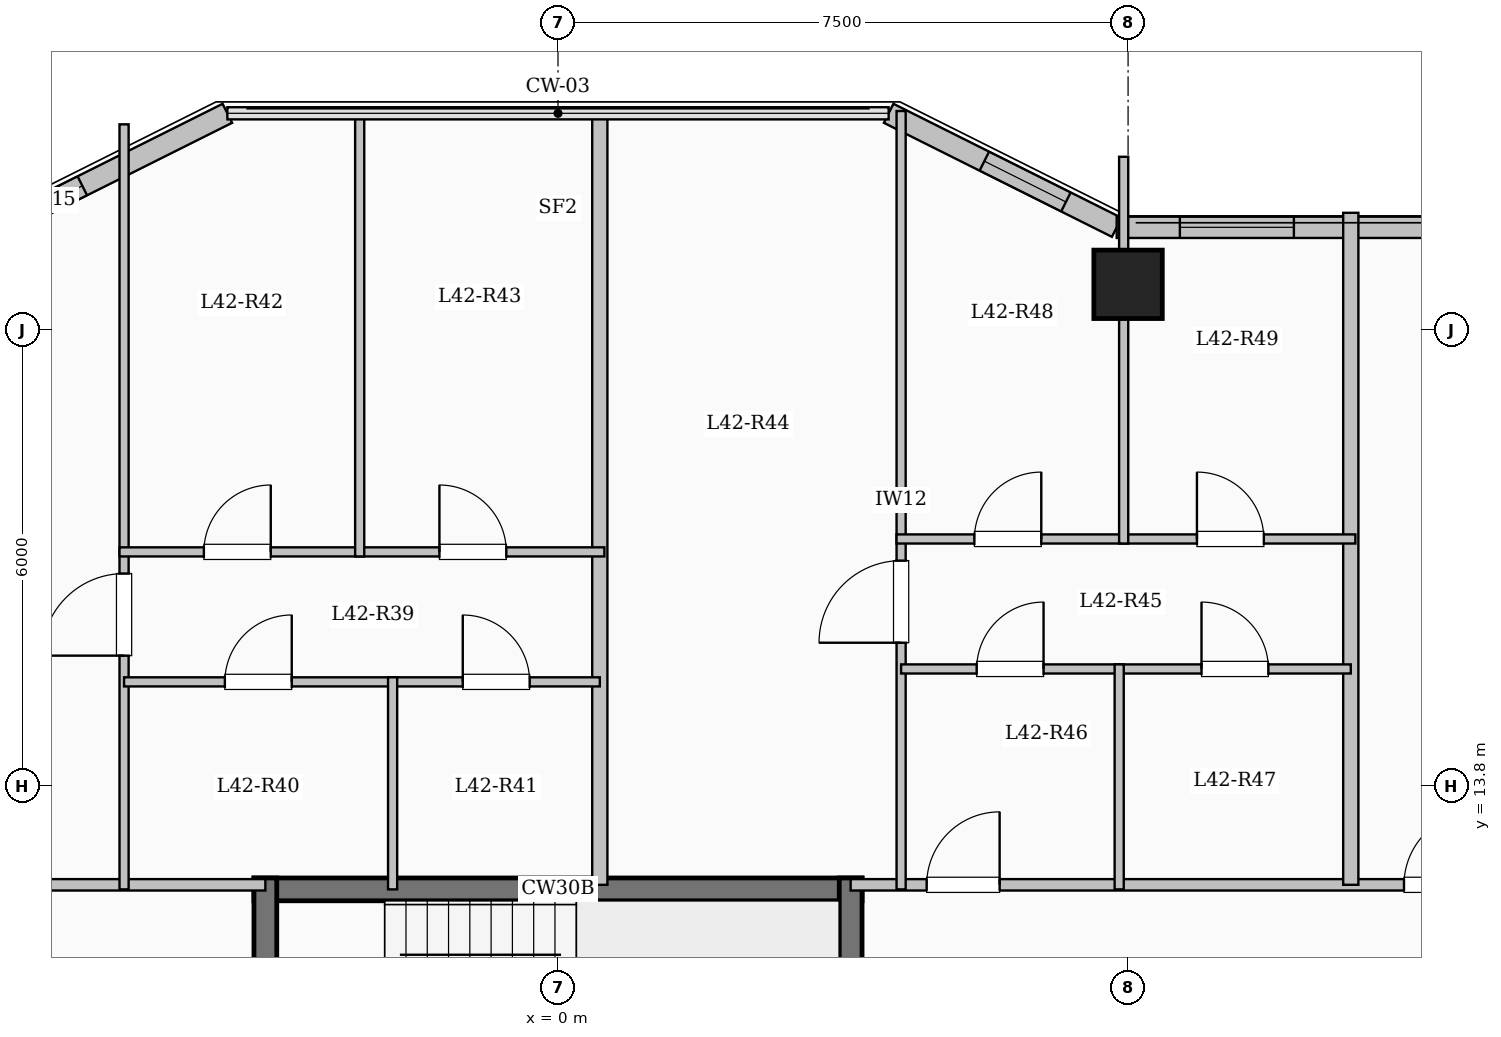
"""IFC4 building model, lengths in metres.
Left out: names, types, materials, properties, quantities, classifications, styles, units other than length and angle.
Written with IfcOpenShell. Run it as: python <this file> out.ifc"""

import sys

from ifc_helpers import new_model, si_unit, direction, frame, frame_2d, origin, origin_2d, place, context, subcontext, project, spatial, rectangle, extrude, element, fill, save


model = new_model("IFC4")
c1 = context("Model", 3, precision=1e-05, world=origin(), true_north=direction((0.0, 1.0)))
c2 = subcontext(c1, "Body", "Model", "MODEL_VIEW")
j1 = project(units=[si_unit("LENGTHUNIT", "METRE"), si_unit("PLANEANGLEUNIT", "RADIAN")], contexts=[c1])
p1 = place(None, origin())
s1 = spatial("IfcSite", under=j1, at=p1, CompositionType="ELEMENT")
p2 = place(p1, origin())
s2 = spatial("IfcBuilding", under=s1, at=p2, CompositionType="ELEMENT")
p3 = place(p2, frame((0.0, 0.0, 156.05)))
s3 = spatial("IfcBuildingStorey", under=s2, at=p3, CompositionType="ELEMENT", Elevation=156.05)
p4 = place(p3, frame((7.5, 20.4, 0.0), z_axis=(0.0, 0.0, 1.0), x_axis=(1.0, 0.0, 0.0)))
e1 = element("IfcColumn", 1, at=p4, inside=s3, PredefinedType="COLUMN", context=c2, shape_type="SweptSolid", body=[
    extrude(rectangle(XDim=0.9, YDim=0.9, at=origin_2d()), origin(), (0.0, 0.0, 1.0), 3.35),
])
p5 = place(p3, frame((-7.35, 21.15, 0.0), z_axis=(0.0, 0.0, 1.0), x_axis=(0.894427191, 0.4472135955, 0.0)))
e2 = element("IfcWall", 2, at=p5, inside=s3, PredefinedType="SOLIDWALL", context=c2, shape_type="SweptSolid", body=[
    extrude(rectangle(XDim=3.354, YDim=0.28, at=frame_2d((1.677, 0.0))), origin(), (0.0, 0.0, 1.0), 3.1),
])
p6 = place(p5, frame((0.371, 0.0, 0.95)))
e3 = element("IfcOpeningElement", 3, at=p6, cuts=e2, PredefinedType="OPENING", context=c2, shape_type="SweptSolid", body=[
    extrude(rectangle(XDim=0.85, YDim=1.5, at=frame_2d((0.425, 0.75))), frame((0.0, 0.15, 0.0), z_axis=(0.0, -1.0, 0.0), x_axis=(1.0, 0.0, 0.0)), (0.0, 0.0, 1.0), 0.3),
])
p7 = place(p3, frame((4.35, 22.65, 0.0), z_axis=(0.0, 0.0, 1.0), x_axis=(0.894427191, -0.4472135955, 0.0)))
e4 = element("IfcWall", 4, at=p7, inside=s3, PredefinedType="SOLIDWALL", context=c2, shape_type="SweptSolid", body=[
    extrude(rectangle(XDim=3.354, YDim=0.28, at=frame_2d((1.677, 0.0))), origin(), (0.0, 0.0, 1.0), 3.1),
])
p8 = place(p7, frame((1.407, 0.0, 0.95)))
e5 = element("IfcOpeningElement", 5, at=p8, cuts=e4, PredefinedType="OPENING", context=c2, shape_type="SweptSolid", body=[
    extrude(rectangle(XDim=1.2, YDim=1.5, at=frame_2d((0.6, 0.75))), frame((0.0, 0.15, 0.0), z_axis=(0.0, -1.0, 0.0), x_axis=(1.0, 0.0, 0.0)), (0.0, 0.0, 1.0), 0.3),
])
p9 = place(p3, frame((7.35, 21.15, 0.0), z_axis=(0.0, 0.0, 1.0), x_axis=(1.0, 0.0, 0.0)))
e6 = element("IfcWall", 6, at=p9, inside=s3, PredefinedType="SOLIDWALL", context=c2, shape_type="SweptSolid", body=[
    extrude(rectangle(XDim=12.3, YDim=0.28, at=frame_2d((6.15, 0.0))), origin(), (0.0, 0.0, 1.0), 3.1),
])
p10 = place(p9, frame((0.831, 0.0, 0.9)))
e7 = element("IfcOpeningElement", 7, at=p10, cuts=e6, PredefinedType="OPENING", context=c2, shape_type="SweptSolid", body=[
    extrude(rectangle(XDim=1.5, YDim=1.65, at=frame_2d((0.75, 0.825))), frame((0.0, 0.15, 0.0), z_axis=(0.0, -1.0, 0.0), x_axis=(1.0, 0.0, 0.0)), (0.0, 0.0, 1.0), 0.3),
])
p11 = place(p9, frame((4.272, 0.0, 0.9)))
e8 = element("IfcOpeningElement", 8, at=p11, cuts=e6, PredefinedType="OPENING", context=c2, shape_type="SweptSolid", body=[
    extrude(rectangle(XDim=2.2, YDim=1.75, at=frame_2d((1.1, 0.875))), frame((0.0, 0.15, 0.0), z_axis=(0.0, -1.0, 0.0), x_axis=(1.0, 0.0, 0.0)), (0.0, 0.0, 1.0), 0.3),
])
p12 = place(p9, frame((9.115, 0.0, 0.9)))
e9 = element("IfcOpeningElement", 9, at=p12, cuts=e6, PredefinedType="OPENING", context=c2, shape_type="SweptSolid", body=[
    extrude(rectangle(XDim=1.65, YDim=1.6, at=frame_2d((0.825, 0.8))), frame((0.0, 0.15, 0.0), z_axis=(0.0, -1.0, 0.0), x_axis=(1.0, 0.0, 0.0)), (0.0, 0.0, 1.0), 0.3),
])
p13 = place(p3, frame((-4.0, 12.44, 0.0), z_axis=(0.0, 0.0, 1.0), x_axis=(1.0, 0.0, 0.0)))
e10 = element("IfcWall", 10, at=p13, inside=s3, PredefinedType="SHEAR", context=c2, shape_type="SweptSolid", body=[
    extrude(rectangle(XDim=8.0, YDim=0.3, at=frame_2d((4.0, 0.0))), origin(), (0.0, 0.0, 1.0), 3.35),
])
for number, where, z_axis, x_axis in (
    (11, (-3.85, 9.0, 0.0), (0.0, 0.0, 1.0), (0.0, 1.0, 0.0)),
    (12, (3.85, 9.0, 0.0), (0.0, 0.0, 1.0), (0.0, 1.0, 0.0)),
):
    element("IfcWall", number, at=place(p3, frame(where, z_axis=z_axis, x_axis=x_axis)), inside=s3, PredefinedType="SHEAR", context=c2, shape_type="SweptSolid", body=[
        extrude(rectangle(XDim=3.59, YDim=0.3, at=frame_2d((1.795, 0.0))), origin(), (0.0, 0.0, 1.0), 3.35),
    ])
p14 = place(p3, frame((-19.55, 12.5, 0.0), z_axis=(0.0, 0.0, 1.0), x_axis=(1.0, 0.0, 0.0)))
e13 = element("IfcWall", 13, at=p14, inside=s3, PredefinedType="PARTITIONING", context=c2, shape_type="SweptSolid", body=[
    extrude(rectangle(XDim=15.7, YDim=0.15, at=frame_2d((7.85, 0.0))), origin(), (0.0, 0.0, 1.0), 3.1),
])
p15 = place(p14, frame((0.7, 0.0, 0.0)))
e14 = element("IfcOpeningElement", 14, at=p15, cuts=e13, PredefinedType="OPENING", context=c2, shape_type="SweptSolid", body=[
    extrude(rectangle(XDim=0.96, YDim=2.15, at=frame_2d((0.48, 1.075))), frame((0.0, 0.085, 0.0), z_axis=(0.0, -1.0, 0.0), x_axis=(1.0, 0.0, 0.0)), (0.0, 0.0, 1.0), 0.17),
])
p16 = place(p14, frame((10.348, 0.0, 0.0)))
e15 = element("IfcOpeningElement", 15, at=p16, cuts=e13, PredefinedType="OPENING", context=c2, shape_type="SweptSolid", body=[
    extrude(rectangle(XDim=0.96, YDim=2.15, at=frame_2d((0.48, 1.075))), frame((0.0, 0.085, 0.0), z_axis=(0.0, -1.0, 0.0), x_axis=(1.0, 0.0, 0.0)), (0.0, 0.0, 1.0), 0.17),
])
p17 = place(p3, frame((3.85, 12.5, 0.0), z_axis=(0.0, 0.0, 1.0), x_axis=(1.0, 0.0, 0.0)))
e16 = element("IfcWall", 16, at=p17, inside=s3, PredefinedType="PARTITIONING", context=c2, shape_type="SweptSolid", body=[
    extrude(rectangle(XDim=15.7, YDim=0.15, at=frame_2d((7.85, 0.0))), origin(), (0.0, 0.0, 1.0), 3.1),
])
p18 = place(p17, frame((1.0, 0.0, 0.0)))
e17 = element("IfcOpeningElement", 17, at=p18, cuts=e16, PredefinedType="OPENING", context=c2, shape_type="SweptSolid", body=[
    extrude(rectangle(XDim=0.96, YDim=2.15, at=frame_2d((0.48, 1.075))), frame((0.0, 0.085, 0.0), z_axis=(0.0, -1.0, 0.0), x_axis=(1.0, 0.0, 0.0)), (0.0, 0.0, 1.0), 0.17),
])
p19 = place(p17, frame((7.28, 0.0, 0.0)))
e18 = element("IfcOpeningElement", 18, at=p19, cuts=e16, PredefinedType="OPENING", context=c2, shape_type="SweptSolid", body=[
    extrude(rectangle(XDim=0.96, YDim=2.15, at=frame_2d((0.48, 1.075))), frame((0.0, 0.085, 0.0), z_axis=(0.0, -1.0, 0.0), x_axis=(1.0, 0.0, 0.0)), (0.0, 0.0, 1.0), 0.17),
])
p20 = place(p3, frame((0.55, 12.5, 0.0), z_axis=(0.0, 0.0, 1.0), x_axis=(0.0, 1.0, 0.0)))
e19 = element("IfcWall", 19, at=p20, inside=s3, PredefinedType="SOLIDWALL", context=c2, shape_type="SweptSolid", body=[
    extrude(rectangle(XDim=10.18, YDim=0.2, at=frame_2d((5.09, 0.0))), origin(), (0.0, 0.0, 1.0), 3.1),
])
p21 = place(p3, frame((-5.709, 12.44, 0.0), z_axis=(0.0, 0.0, 1.0), x_axis=(0.0, 1.0, 0.0)))
e20 = element("IfcWall", 20, at=p21, inside=s3, PredefinedType="PARTITIONING", context=c2, shape_type="SweptSolid", body=[
    extrude(rectangle(XDim=10.065, YDim=0.12, at=frame_2d((5.032, 0.0))), origin(), (0.0, 0.0, 1.0), 3.1),
])
p22 = place(p21, frame((3.075, 0.0, 0.0)))
e21 = element("IfcOpeningElement", 21, at=p22, cuts=e20, PredefinedType="OPENING", context=c2, shape_type="SweptSolid", body=[
    extrude(rectangle(XDim=1.08, YDim=2.15, at=frame_2d((0.54, 1.075))), frame((0.0, 0.07, 0.0), z_axis=(0.0, -1.0, 0.0), x_axis=(1.0, 0.0, 0.0)), (0.0, 0.0, 1.0), 0.14),
])
p23 = place(p3, frame((-5.709, 15.17, 0.0), z_axis=(0.0, 0.0, 1.0), x_axis=(1.0, 0.0, 0.0)))
e22 = element("IfcWall", 22, at=p23, inside=s3, PredefinedType="PARTITIONING", context=c2, shape_type="SweptSolid", body=[
    extrude(rectangle(XDim=3.533, YDim=0.12, at=frame_2d((1.767, 0.0))), origin(), (0.0, 0.0, 1.0), 3.1),
])
p24 = place(p23, frame((1.326, 0.0, 0.0)))
e23 = element("IfcOpeningElement", 23, at=p24, cuts=e22, PredefinedType="OPENING", context=c2, shape_type="SweptSolid", body=[
    extrude(rectangle(XDim=0.88, YDim=2.1, at=frame_2d((0.44, 1.05))), frame((0.0, 0.07, 0.0), z_axis=(0.0, -1.0, 0.0), x_axis=(1.0, 0.0, 0.0)), (0.0, 0.0, 1.0), 0.14),
])
p25 = place(p3, frame((-2.176, 15.17, 0.0), z_axis=(0.0, 0.0, 1.0), x_axis=(1.0, 0.0, 0.0)))
e24 = element("IfcWall", 24, at=p25, inside=s3, PredefinedType="PARTITIONING", context=c2, shape_type="SweptSolid", body=[
    extrude(rectangle(XDim=2.726, YDim=0.12, at=frame_2d((1.363, 0.0))), origin(), (0.0, 0.0, 1.0), 3.1),
])
p26 = place(p25, frame((0.923, 0.0, 0.0)))
e25 = element("IfcOpeningElement", 25, at=p26, cuts=e24, PredefinedType="OPENING", context=c2, shape_type="SweptSolid", body=[
    extrude(rectangle(XDim=0.88, YDim=2.1, at=frame_2d((0.44, 1.05))), frame((0.0, 0.07, 0.0), z_axis=(0.0, -1.0, 0.0), x_axis=(1.0, 0.0, 0.0)), (0.0, 0.0, 1.0), 0.14),
])
p27 = place(p3, frame((-5.769, 16.88, 0.0), z_axis=(0.0, 0.0, 1.0), x_axis=(1.0, 0.0, 0.0)))
e26 = element("IfcWall", 26, at=p27, inside=s3, PredefinedType="PARTITIONING", context=c2, shape_type="SweptSolid", body=[
    extrude(rectangle(XDim=6.379, YDim=0.12, at=frame_2d((3.189, 0.0))), origin(), (0.0, 0.0, 1.0), 2.685),
])
p28 = place(p27, frame((1.11, 0.0, 0.0)))
e27 = element("IfcOpeningElement", 27, at=p28, cuts=e26, PredefinedType="OPENING", context=c2, shape_type="SweptSolid", body=[
    extrude(rectangle(XDim=0.88, YDim=2.1, at=frame_2d((0.44, 1.05))), frame((0.0, 0.07, 0.0), z_axis=(0.0, -1.0, 0.0), x_axis=(1.0, 0.0, 0.0)), (0.0, 0.0, 1.0), 0.14),
])
p29 = place(p27, frame((4.209, 0.0, 0.0)))
e28 = element("IfcOpeningElement", 28, at=p29, cuts=e26, PredefinedType="OPENING", context=c2, shape_type="SweptSolid", body=[
    extrude(rectangle(XDim=0.88, YDim=2.1, at=frame_2d((0.44, 1.05))), frame((0.0, 0.07, 0.0), z_axis=(0.0, -1.0, 0.0), x_axis=(1.0, 0.0, 0.0)), (0.0, 0.0, 1.0), 0.14),
])
p30 = place(p3, frame((-2.176, 12.44, 0.0), z_axis=(0.0, 0.0, 1.0), x_axis=(0.0, 1.0, 0.0)))
e29 = element("IfcWall", 29, at=p30, inside=s3, PredefinedType="PARTITIONING", context=c2, shape_type="SweptSolid", body=[
    extrude(rectangle(XDim=2.79, YDim=0.12, at=frame_2d((1.395, 0.0))), origin(), (0.0, 0.0, 1.0), 3.1),
])
p31 = place(p3, frame((-2.609, 16.82, 0.0), z_axis=(0.0, 0.0, 1.0), x_axis=(0.0, 1.0, 0.0)))
e30 = element("IfcWall", 30, at=p31, inside=s3, PredefinedType="PARTITIONING", context=c2, shape_type="SweptSolid", body=[
    extrude(rectangle(XDim=5.86, YDim=0.12, at=frame_2d((2.93, 0.0))), origin(), (0.0, 0.0, 1.0), 3.1),
])
p32 = place(p3, frame((10.43, 12.5, 0.0), z_axis=(0.0, 0.0, 1.0), x_axis=(0.0, 1.0, 0.0)))
e31 = element("IfcWall", 31, at=p32, inside=s3, PredefinedType="SOLIDWALL", context=c2, shape_type="SweptSolid", body=[
    extrude(rectangle(XDim=8.841, YDim=0.2, at=frame_2d((4.42, 0.0))), origin(), (0.0, 0.0, 1.0), 3.1),
])
p33 = place(p3, frame((4.514, 12.44, 0.0), z_axis=(0.0, 0.0, 1.0), x_axis=(0.0, 1.0, 0.0)))
e32 = element("IfcWall", 32, at=p33, inside=s3, PredefinedType="PARTITIONING", context=c2, shape_type="SweptSolid", body=[
    extrude(rectangle(XDim=10.24, YDim=0.12, at=frame_2d((5.12, 0.0))), origin(), (0.0, 0.0, 1.0), 3.1),
])
p34 = place(p33, frame((3.245, 0.0, 0.0)))
e33 = element("IfcOpeningElement", 33, at=p34, cuts=e32, PredefinedType="OPENING", context=c2, shape_type="SweptSolid", body=[
    extrude(rectangle(XDim=1.08, YDim=2.15, at=frame_2d((0.54, 1.075))), frame((0.0, 0.07, 0.0), z_axis=(0.0, -1.0, 0.0), x_axis=(1.0, 0.0, 0.0)), (0.0, 0.0, 1.0), 0.14),
])
p35 = place(p3, frame((4.514, 15.34, 0.0), z_axis=(0.0, 0.0, 1.0), x_axis=(1.0, 0.0, 0.0)))
e34 = element("IfcWall", 34, at=p35, inside=s3, PredefinedType="PARTITIONING", context=c2, shape_type="SweptSolid", body=[
    extrude(rectangle(XDim=2.869, YDim=0.12, at=frame_2d((1.435, 0.0))), origin(), (0.0, 0.0, 1.0), 3.1),
])
p36 = place(p35, frame((0.994, 0.0, 0.0)))
e35 = element("IfcOpeningElement", 35, at=p36, cuts=e34, PredefinedType="OPENING", context=c2, shape_type="SweptSolid", body=[
    extrude(rectangle(XDim=0.88, YDim=2.1, at=frame_2d((0.44, 1.05))), frame((0.0, 0.07, 0.0), z_axis=(0.0, -1.0, 0.0), x_axis=(1.0, 0.0, 0.0)), (0.0, 0.0, 1.0), 0.14),
])
p37 = place(p3, frame((7.383, 15.34, 0.0), z_axis=(0.0, 0.0, 1.0), x_axis=(1.0, 0.0, 0.0)))
e36 = element("IfcWall", 36, at=p37, inside=s3, PredefinedType="PARTITIONING", context=c2, shape_type="SweptSolid", body=[
    extrude(rectangle(XDim=3.047, YDim=0.12, at=frame_2d((1.523, 0.0))), origin(), (0.0, 0.0, 1.0), 3.1),
])
p38 = place(p37, frame((1.083, 0.0, 0.0)))
e37 = element("IfcOpeningElement", 37, at=p38, cuts=e36, PredefinedType="OPENING", context=c2, shape_type="SweptSolid", body=[
    extrude(rectangle(XDim=0.88, YDim=2.1, at=frame_2d((0.44, 1.05))), frame((0.0, 0.07, 0.0), z_axis=(0.0, -1.0, 0.0), x_axis=(1.0, 0.0, 0.0)), (0.0, 0.0, 1.0), 0.14),
])
p39 = place(p3, frame((4.454, 17.05, 0.0), z_axis=(0.0, 0.0, 1.0), x_axis=(1.0, 0.0, 0.0)))
e38 = element("IfcWall", 38, at=p39, inside=s3, PredefinedType="PARTITIONING", context=c2, shape_type="SweptSolid", body=[
    extrude(rectangle(XDim=6.036, YDim=0.12, at=frame_2d((3.018, 0.0))), origin(), (0.0, 0.0, 1.0), 2.685),
])
p40 = place(p39, frame((1.024, 0.0, 0.0)))
e39 = element("IfcOpeningElement", 39, at=p40, cuts=e38, PredefinedType="OPENING", context=c2, shape_type="SweptSolid", body=[
    extrude(rectangle(XDim=0.88, YDim=2.1, at=frame_2d((0.44, 1.05))), frame((0.0, 0.07, 0.0), z_axis=(0.0, -1.0, 0.0), x_axis=(1.0, 0.0, 0.0)), (0.0, 0.0, 1.0), 0.14),
])
p41 = place(p39, frame((3.952, 0.0, 0.0)))
e40 = element("IfcOpeningElement", 40, at=p41, cuts=e38, PredefinedType="OPENING", context=c2, shape_type="SweptSolid", body=[
    extrude(rectangle(XDim=0.88, YDim=2.1, at=frame_2d((0.44, 1.05))), frame((0.0, 0.07, 0.0), z_axis=(0.0, -1.0, 0.0), x_axis=(1.0, 0.0, 0.0)), (0.0, 0.0, 1.0), 0.14),
])
p42 = place(p3, frame((7.383, 12.44, 0.0), z_axis=(0.0, 0.0, 1.0), x_axis=(0.0, 1.0, 0.0)))
e41 = element("IfcWall", 41, at=p42, inside=s3, PredefinedType="PARTITIONING", context=c2, shape_type="SweptSolid", body=[
    extrude(rectangle(XDim=2.96, YDim=0.12, at=frame_2d((1.48, 0.0))), origin(), (0.0, 0.0, 1.0), 2.585),
])
p43 = place(p3, frame((7.442, 16.99, 0.0), z_axis=(0.0, 0.0, 1.0), x_axis=(0.0, 1.0, 0.0)))
e42 = element("IfcWall", 42, at=p43, inside=s3, PredefinedType="PARTITIONING", context=c2, shape_type="SweptSolid", body=[
    extrude(rectangle(XDim=5.088, YDim=0.12, at=frame_2d((2.544, 0.0))), origin(), (0.0, 0.0, 1.0), 2.585),
])
p44 = place(p6, origin())
e43 = element("IfcWindow", 43, at=p44, inside=s3, PartitioningType="SINGLE_PANEL", PredefinedType="WINDOW", context=c2, shape_type="SweptSolid", body=[
    extrude(rectangle(XDim=0.85, YDim=1.5, at=frame_2d((0.425, 0.75))), frame((0.0, 0.03, 0.0), z_axis=(0.0, -1.0, 0.0), x_axis=(1.0, 0.0, 0.0)), (0.0, 0.0, 1.0), 0.06),
])
fill(e3, e43)
p45 = place(p8, origin())
e44 = element("IfcWindow", 44, at=p45, inside=s3, PartitioningType="SINGLE_PANEL", PredefinedType="WINDOW", context=c2, shape_type="SweptSolid", body=[
    extrude(rectangle(XDim=1.2, YDim=1.5, at=frame_2d((0.6, 0.75))), frame((0.0, 0.03, 0.0), z_axis=(0.0, -1.0, 0.0), x_axis=(1.0, 0.0, 0.0)), (0.0, 0.0, 1.0), 0.06),
])
fill(e5, e44)
p46 = place(p10, origin())
e45 = element("IfcWindow", 45, at=p46, inside=s3, PartitioningType="SINGLE_PANEL", PredefinedType="WINDOW", context=c2, shape_type="SweptSolid", body=[
    extrude(rectangle(XDim=1.5, YDim=1.65, at=frame_2d((0.75, 0.825))), frame((0.0, 0.03, 0.0), z_axis=(0.0, -1.0, 0.0), x_axis=(1.0, 0.0, 0.0)), (0.0, 0.0, 1.0), 0.06),
])
fill(e7, e45)
p47 = place(p22, origin())
e46 = element("IfcDoor", 46, at=p47, inside=s3, OperationType="SINGLE_SWING_LEFT", PredefinedType="DOOR", context=c2, shape_type="SweptSolid", body=[
    extrude(rectangle(XDim=1.08, YDim=2.15, at=frame_2d((0.54, 1.075))), frame((0.0, 0.025, 0.0), z_axis=(0.0, -1.0, 0.0), x_axis=(1.0, 0.0, 0.0)), (0.0, 0.0, 1.0), 0.05),
])
fill(e21, e46)
p48 = place(p24, origin())
e47 = element("IfcDoor", 47, at=p48, inside=s3, OperationType="SINGLE_SWING_RIGHT", PredefinedType="DOOR", context=c2, shape_type="SweptSolid", body=[
    extrude(rectangle(XDim=0.88, YDim=2.1, at=frame_2d((0.44, 1.05))), frame((0.0, 0.025, 0.0), z_axis=(0.0, -1.0, 0.0), x_axis=(1.0, 0.0, 0.0)), (0.0, 0.0, 1.0), 0.05),
])
fill(e23, e47)
p49 = place(p26, origin())
e48 = element("IfcDoor", 48, at=p49, inside=s3, OperationType="SINGLE_SWING_LEFT", PredefinedType="DOOR", context=c2, shape_type="SweptSolid", body=[
    extrude(rectangle(XDim=0.88, YDim=2.1, at=frame_2d((0.44, 1.05))), frame((0.0, 0.025, 0.0), z_axis=(0.0, -1.0, 0.0), x_axis=(1.0, 0.0, 0.0)), (0.0, 0.0, 1.0), 0.05),
])
fill(e25, e48)
p50 = place(p28, origin())
e49 = element("IfcDoor", 49, at=p50, inside=s3, OperationType="SINGLE_SWING_RIGHT", PredefinedType="DOOR", context=c2, shape_type="SweptSolid", body=[
    extrude(rectangle(XDim=0.88, YDim=2.1, at=frame_2d((0.44, 1.05))), frame((0.0, 0.025, 0.0), z_axis=(0.0, -1.0, 0.0), x_axis=(1.0, 0.0, 0.0)), (0.0, 0.0, 1.0), 0.05),
])
fill(e27, e49)
p51 = place(p29, origin())
e50 = element("IfcDoor", 50, at=p51, inside=s3, OperationType="SINGLE_SWING_LEFT", PredefinedType="DOOR", context=c2, shape_type="SweptSolid", body=[
    extrude(rectangle(XDim=0.88, YDim=2.1, at=frame_2d((0.44, 1.05))), frame((0.0, 0.025, 0.0), z_axis=(0.0, -1.0, 0.0), x_axis=(1.0, 0.0, 0.0)), (0.0, 0.0, 1.0), 0.05),
])
fill(e28, e50)
p52 = place(p18, origin())
e51 = element("IfcDoor", 51, at=p52, inside=s3, OperationType="SINGLE_SWING_RIGHT", PredefinedType="DOOR", context=c2, shape_type="SweptSolid", body=[
    extrude(rectangle(XDim=0.96, YDim=2.15, at=frame_2d((0.48, 1.075))), frame((0.0, 0.025, 0.0), z_axis=(0.0, -1.0, 0.0), x_axis=(1.0, 0.0, 0.0)), (0.0, 0.0, 1.0), 0.05),
])
fill(e17, e51)
p53 = place(p34, origin())
e52 = element("IfcDoor", 52, at=p53, inside=s3, OperationType="SINGLE_SWING_LEFT", PredefinedType="DOOR", context=c2, shape_type="SweptSolid", body=[
    extrude(rectangle(XDim=1.08, YDim=2.15, at=frame_2d((0.54, 1.075))), frame((0.0, 0.025, 0.0), z_axis=(0.0, -1.0, 0.0), x_axis=(1.0, 0.0, 0.0)), (0.0, 0.0, 1.0), 0.05),
])
fill(e33, e52)
p54 = place(p36, origin())
e53 = element("IfcDoor", 53, at=p54, inside=s3, OperationType="SINGLE_SWING_RIGHT", PredefinedType="DOOR", context=c2, shape_type="SweptSolid", body=[
    extrude(rectangle(XDim=0.88, YDim=2.1, at=frame_2d((0.44, 1.05))), frame((0.0, 0.025, 0.0), z_axis=(0.0, -1.0, 0.0), x_axis=(1.0, 0.0, 0.0)), (0.0, 0.0, 1.0), 0.05),
])
fill(e35, e53)
p55 = place(p38, origin())
e54 = element("IfcDoor", 54, at=p55, inside=s3, OperationType="SINGLE_SWING_LEFT", PredefinedType="DOOR", context=c2, shape_type="SweptSolid", body=[
    extrude(rectangle(XDim=0.88, YDim=2.1, at=frame_2d((0.44, 1.05))), frame((0.0, 0.025, 0.0), z_axis=(0.0, -1.0, 0.0), x_axis=(1.0, 0.0, 0.0)), (0.0, 0.0, 1.0), 0.05),
])
fill(e37, e54)
p56 = place(p40, origin())
e55 = element("IfcDoor", 55, at=p56, inside=s3, OperationType="SINGLE_SWING_RIGHT", PredefinedType="DOOR", context=c2, shape_type="SweptSolid", body=[
    extrude(rectangle(XDim=0.88, YDim=2.1, at=frame_2d((0.44, 1.05))), frame((0.0, 0.025, 0.0), z_axis=(0.0, -1.0, 0.0), x_axis=(1.0, 0.0, 0.0)), (0.0, 0.0, 1.0), 0.05),
])
fill(e39, e55)
p57 = place(p41, origin())
e56 = element("IfcDoor", 56, at=p57, inside=s3, OperationType="SINGLE_SWING_LEFT", PredefinedType="DOOR", context=c2, shape_type="SweptSolid", body=[
    extrude(rectangle(XDim=0.88, YDim=2.1, at=frame_2d((0.44, 1.05))), frame((0.0, 0.025, 0.0), z_axis=(0.0, -1.0, 0.0), x_axis=(1.0, 0.0, 0.0)), (0.0, 0.0, 1.0), 0.05),
])
fill(e40, e56)
p58 = place(p19, origin())
e57 = element("IfcDoor", 57, at=p58, inside=s3, OperationType="SINGLE_SWING_RIGHT", PredefinedType="DOOR", context=c2, shape_type="SweptSolid", body=[
    extrude(rectangle(XDim=0.96, YDim=2.15, at=frame_2d((0.48, 1.075))), frame((0.0, 0.025, 0.0), z_axis=(0.0, -1.0, 0.0), x_axis=(1.0, 0.0, 0.0)), (0.0, 0.0, 1.0), 0.05),
])
fill(e18, e57)
save(model, sys.argv[1])
